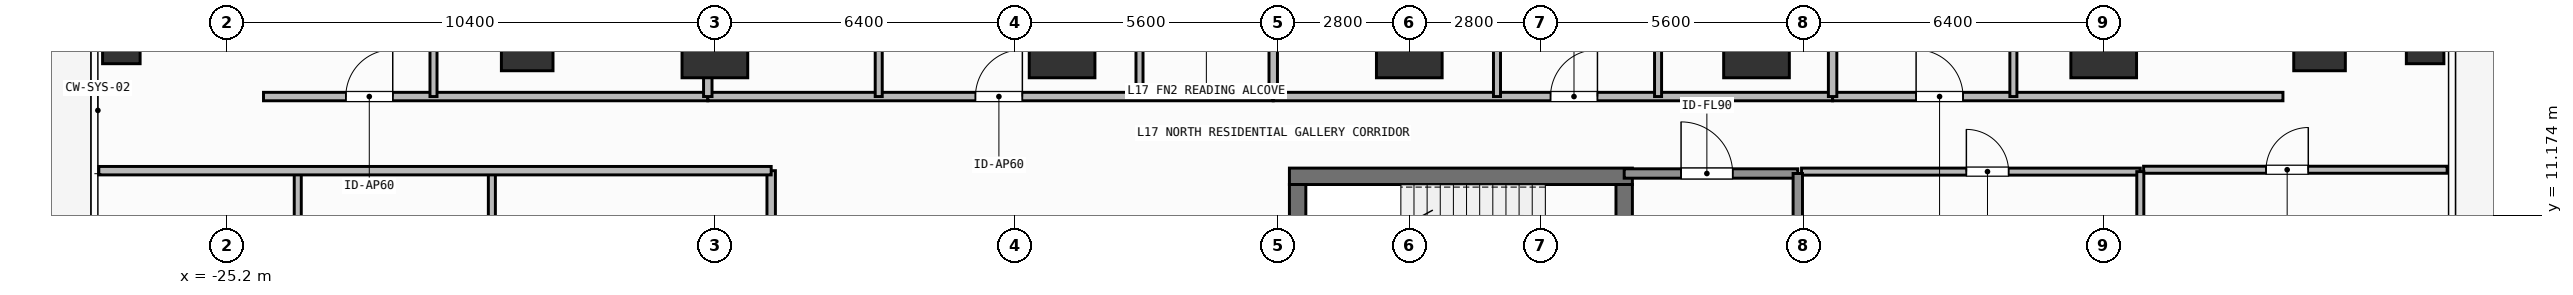
"""IFC4 building model, lengths in metres.
Left out: names, types, materials, properties, quantities, classifications, styles, units other than length and angle.
Written with IfcOpenShell. Run it as: python <this file> out.ifc"""

import sys

from ifc_helpers import new_model, si_unit, direction, frame, frame_2d, origin, origin_2d, place, context, subcontext, project, spatial, rectangle, hollow_rectangle, extrude, element, fill, save


model = new_model("IFC4")
c1 = context("Model", 3, precision=1e-05, world=origin(), true_north=direction((0.0, 1.0)))
c2 = subcontext(c1, "Body", "Model", "MODEL_VIEW")
j1 = project(units=[si_unit("LENGTHUNIT", "METRE"), si_unit("PLANEANGLEUNIT", "RADIAN")], contexts=[c1])
p1 = place(None, origin())
s1 = spatial("IfcSite", under=j1, at=p1, CompositionType="ELEMENT")
p2 = place(p1, origin())
s2 = spatial("IfcBuilding", under=s1, at=p2, CompositionType="ELEMENT")
p3 = place(p2, frame((0.0, 0.0, 65.7)))
s3 = spatial("IfcBuildingStorey", under=s2, at=p3, CompositionType="ELEMENT", Elevation=65.7)
p4 = place(p3, frame((-2.555, 12.0, 0.0), z_axis=(0.0, 0.0, 1.0), x_axis=(1.0, 0.0, 0.0)))
e1 = element("IfcWall", 1, at=p4, inside=s3, PredefinedType="SHEAR", context=c2, shape_type="SweptSolid", body=[
    extrude(rectangle(XDim=7.31, YDim=0.35, at=frame_2d((3.655, 0.0))), origin(), (0.0, 0.0, 1.0), 3.9),
])
p5 = place(p3, frame((-2.38, 8.9, 0.0), z_axis=(0.0, 0.0, 1.0), x_axis=(0.0, 1.0, 0.0)))
e2 = element("IfcWall", 2, at=p5, inside=s3, PredefinedType="SHEAR", context=c2, shape_type="SweptSolid", body=[
    extrude(rectangle(XDim=2.925, YDim=0.35, at=frame_2d((1.462, 0.0))), origin(), (0.0, 0.0, 1.0), 3.9),
])
p6 = place(p3, frame((4.58, 11.825, 0.0), z_axis=(0.0, 0.0, 1.0), x_axis=(0.0, -1.0, 0.0)))
e3 = element("IfcWall", 3, at=p6, inside=s3, PredefinedType="SHEAR", context=c2, shape_type="SweptSolid", body=[
    extrude(rectangle(XDim=2.925, YDim=0.35, at=frame_2d((1.462, 0.0))), origin(), (0.0, 0.0, 1.0), 3.9),
])
p7 = place(p6, frame((0.913, 0.0, 0.0)))
e4 = element("IfcOpeningElement", 4, at=p7, cuts=e3, PredefinedType="OPENING", context=c2, shape_type="SweptSolid", body=[
    extrude(rectangle(XDim=1.1, YDim=2.15, at=frame_2d((0.55, 1.075))), frame((0.0, 0.185, 0.0), z_axis=(0.0, -1.0, 0.0), x_axis=(1.0, 0.0, 0.0)), (0.0, 0.0, 1.0), 0.37),
])
for number, where, z_axis, x_axis in (
    (5, (-14.8, 14.8, 0.0), (0.0, 0.0, 1.0), (1.0, 0.0, 0.0)),
    (6, (-7.4, 14.8, 0.0), (0.0, 0.0, 1.0), (1.0, 0.0, 0.0)),
    (7, (0.0, 14.8, 0.0), (0.0, 0.0, 1.0), (1.0, 0.0, 0.0)),
    (8, (7.4, 14.8, 0.0), (0.0, 0.0, 1.0), (1.0, 0.0, 0.0)),
    (9, (14.8, 14.8, 0.0), (0.0, 0.0, 1.0), (1.0, 0.0, 0.0)),
):
    element("IfcColumn", number, at=place(p3, frame(where, z_axis=z_axis, x_axis=x_axis)), inside=s3, PredefinedType="COLUMN", context=c2, shape_type="SweptSolid", body=[
        extrude(rectangle(XDim=1.4, YDim=1.4, at=origin_2d()), origin(), (0.0, 0.0, 1.0), 3.9),
    ])
for number, where, z_axis, x_axis in (
    (10, (-18.8, 14.8, 0.0), (0.0, 0.0, 1.0), (1.0, 0.0, 0.0)),
    (11, (19.4, 14.8, 0.0), (0.0, 0.0, 1.0), (1.0, 0.0, 0.0)),
):
    element("IfcColumn", number, at=place(p3, frame(where, z_axis=z_axis, x_axis=x_axis)), inside=s3, PredefinedType="COLUMN", context=c2, shape_type="SweptSolid", body=[
        extrude(rectangle(XDim=1.1, YDim=1.1, at=origin_2d()), origin(), (0.0, 0.0, 1.0), 3.9),
    ])
for number, where, z_axis, x_axis in (
    (12, (-27.45, 14.8, 0.0), (0.0, 0.0, 1.0), (1.0, 0.0, 0.0)),
    (13, (21.65, 14.8, 0.0), (0.0, 0.0, 1.0), (1.0, 0.0, 0.0)),
):
    element("IfcColumn", number, at=place(p3, frame(where, z_axis=z_axis, x_axis=x_axis)), inside=s3, PredefinedType="COLUMN", context=c2, shape_type="SweptSolid", body=[
        extrude(hollow_rectangle(XDim=0.8, YDim=0.8, WallThickness=0.036, at=origin_2d()), origin(), (0.0, 0.0, 1.0), 3.9),
    ])
p8 = place(p3, frame((4.58, 12.06, 0.0), z_axis=(0.0, 0.0, 1.0), x_axis=(1.0, 0.0, 0.0)))
e14 = element("IfcWall", 14, at=p8, inside=s3, PredefinedType="SOLIDWALL", context=c2, shape_type="SweptSolid", body=[
    extrude(rectangle(XDim=3.7, YDim=0.2, at=frame_2d((1.85, 0.0))), origin(), (0.0, 0.0, 1.0), 3.68),
])
p9 = place(p8, frame((1.212, 0.0, 0.0)))
e15 = element("IfcOpeningElement", 15, at=p9, cuts=e14, PredefinedType="OPENING", context=c2, shape_type="SweptSolid", body=[
    extrude(rectangle(XDim=1.1, YDim=2.15, at=frame_2d((0.55, 1.075))), frame((0.0, 0.11, 0.0), z_axis=(0.0, -1.0, 0.0), x_axis=(1.0, 0.0, 0.0)), (0.0, 0.0, 1.0), 0.22),
])
p10 = place(p3, frame((8.36, 12.1, 0.0), z_axis=(0.0, 0.0, 1.0), x_axis=(1.0, 0.0, 0.0)))
e16 = element("IfcWall", 16, at=p10, inside=s3, PredefinedType="PARTITIONING", context=c2, shape_type="SweptSolid", body=[
    extrude(rectangle(XDim=7.22, YDim=0.15, at=frame_2d((3.61, 0.0))), origin(), (0.0, 0.0, 1.0), 3.68),
])
p11 = place(p10, frame((3.513, 0.0, 0.0)))
e17 = element("IfcOpeningElement", 17, at=p11, cuts=e16, PredefinedType="OPENING", context=c2, shape_type="SweptSolid", body=[
    extrude(rectangle(XDim=0.9, YDim=2.1, at=frame_2d((0.45, 1.05))), frame((0.0, 0.085, 0.0), z_axis=(0.0, -1.0, 0.0), x_axis=(1.0, 0.0, 0.0)), (0.0, 0.0, 1.0), 0.17),
])
p12 = place(p3, frame((-24.42, 13.7, 0.0), z_axis=(0.0, 0.0, 1.0), x_axis=(1.0, 0.0, 0.0)))
e18 = element("IfcWall", 18, at=p12, inside=s3, PredefinedType="PARTITIONING", context=c2, shape_type="SweptSolid", body=[
    extrude(rectangle(XDim=9.469, YDim=0.18, at=frame_2d((4.734, 0.0))), origin(), (0.0, 0.0, 1.0), 3.68),
])
p13 = place(p12, frame((1.754, 0.0, 0.0)))
e19 = element("IfcOpeningElement", 19, at=p13, cuts=e18, PredefinedType="OPENING", context=c2, shape_type="SweptSolid", body=[
    extrude(rectangle(XDim=1.0, YDim=2.2, at=frame_2d((0.5, 1.1))), frame((0.0, 0.1, 0.0), z_axis=(0.0, -1.0, 0.0), x_axis=(1.0, 0.0, 0.0)), (0.0, 0.0, 1.0), 0.2),
])
p14 = place(p3, frame((-20.797, 13.7, 0.0), z_axis=(0.0, 0.0, 1.0), x_axis=(0.0, 1.0, 0.0)))
e20 = element("IfcWall", 20, at=p14, inside=s3, PredefinedType="PARTITIONING", context=c2, shape_type="SweptSolid", body=[
    extrude(rectangle(XDim=3.899, YDim=0.15, at=frame_2d((1.95, 0.0))), origin(), (0.0, 0.0, 1.0), 3.68),
])
p15 = place(p14, frame((1.524, 0.0, 0.0)))
e21 = element("IfcOpeningElement", 21, at=p15, cuts=e20, PredefinedType="OPENING", context=c2, shape_type="SweptSolid", body=[
    extrude(rectangle(XDim=0.85, YDim=2.1, at=frame_2d((0.425, 1.05))), frame((0.0, 0.085, 0.0), z_axis=(0.0, -1.0, 0.0), x_axis=(1.0, 0.0, 0.0)), (0.0, 0.0, 1.0), 0.17),
])
p16 = place(p3, frame((-14.951, 13.7, 0.0), z_axis=(0.0, 0.0, 1.0), x_axis=(1.0, 0.0, 0.0)))
e22 = element("IfcWall", 22, at=p16, inside=s3, PredefinedType="PARTITIONING", context=c2, shape_type="SweptSolid", body=[
    extrude(rectangle(XDim=12.051, YDim=0.18, at=frame_2d((6.025, 0.0))), origin(), (0.0, 0.0, 1.0), 3.68),
])
p17 = place(p16, frame((5.704, 0.0, 0.0)))
e23 = element("IfcOpeningElement", 23, at=p17, cuts=e22, PredefinedType="OPENING", context=c2, shape_type="SweptSolid", body=[
    extrude(rectangle(XDim=1.0, YDim=2.2, at=frame_2d((0.5, 1.1))), frame((0.0, 0.1, 0.0), z_axis=(0.0, -1.0, 0.0), x_axis=(1.0, 0.0, 0.0)), (0.0, 0.0, 1.0), 0.2),
])
p18 = place(p3, frame((-11.308, 13.7, 0.0), z_axis=(0.0, 0.0, 1.0), x_axis=(0.0, 1.0, 0.0)))
e24 = element("IfcWall", 24, at=p18, inside=s3, PredefinedType="PARTITIONING", context=c2, shape_type="SweptSolid", body=[
    extrude(rectangle(XDim=7.09, YDim=0.15, at=frame_2d((3.545, 0.0))), origin(), (0.0, 0.0, 1.0), 3.37),
])
p19 = place(p18, frame((3.03, 0.0, 0.0)))
e25 = element("IfcOpeningElement", 25, at=p19, cuts=e24, PredefinedType="OPENING", context=c2, shape_type="SweptSolid", body=[
    extrude(rectangle(XDim=0.85, YDim=2.1, at=frame_2d((0.425, 1.05))), frame((0.0, 0.085, 0.0), z_axis=(0.0, -1.0, 0.0), x_axis=(1.0, 0.0, 0.0)), (0.0, 0.0, 1.0), 0.17),
])
p20 = place(p3, frame((-5.75, 13.7, 0.0), z_axis=(0.0, 0.0, 1.0), x_axis=(0.0, 1.0, 0.0)))
e26 = element("IfcWall", 26, at=p20, inside=s3, PredefinedType="PARTITIONING", context=c2, shape_type="SweptSolid", body=[
    extrude(rectangle(XDim=4.02, YDim=0.15, at=frame_2d((2.01, 0.0))), origin(), (0.0, 0.0, 1.0), 3.68),
])
p21 = place(p20, frame((1.941, 0.0, 0.0)))
e27 = element("IfcOpeningElement", 27, at=p21, cuts=e26, PredefinedType="OPENING", context=c2, shape_type="SweptSolid", body=[
    extrude(rectangle(XDim=0.85, YDim=2.1, at=frame_2d((0.425, 1.05))), frame((0.0, 0.085, 0.0), z_axis=(0.0, -1.0, 0.0), x_axis=(1.0, 0.0, 0.0)), (0.0, 0.0, 1.0), 0.17),
])
p22 = place(p3, frame((-2.9, 13.7, 0.0), z_axis=(0.0, 0.0, 1.0), x_axis=(1.0, 0.0, 0.0)))
e28 = element("IfcWall", 28, at=p22, inside=s3, PredefinedType="PARTITIONING", context=c2, shape_type="SweptSolid", body=[
    extrude(rectangle(XDim=11.922, YDim=0.18, at=frame_2d((5.961, 0.0))), origin(), (0.0, 0.0, 1.0), 3.68),
])
p23 = place(p22, frame((5.91, 0.0, 0.0)))
e29 = element("IfcOpeningElement", 29, at=p23, cuts=e28, PredefinedType="OPENING", context=c2, shape_type="SweptSolid", body=[
    extrude(rectangle(XDim=1.0, YDim=2.2, at=frame_2d((0.5, 1.1))), frame((0.0, 0.1, 0.0), z_axis=(0.0, -1.0, 0.0), x_axis=(1.0, 0.0, 0.0)), (0.0, 0.0, 1.0), 0.2),
])
p24 = place(p3, frame((1.869, 13.7, 0.0), z_axis=(0.0, 0.0, 1.0), x_axis=(0.0, 1.0, 0.0)))
e30 = element("IfcWall", 30, at=p24, inside=s3, PredefinedType="PARTITIONING", context=c2, shape_type="SweptSolid", body=[
    extrude(rectangle(XDim=7.09, YDim=0.15, at=frame_2d((3.545, 0.0))), origin(), (0.0, 0.0, 1.0), 3.68),
])
p25 = place(p24, frame((3.03, 0.0, 0.0)))
e31 = element("IfcOpeningElement", 31, at=p25, cuts=e30, PredefinedType="OPENING", context=c2, shape_type="SweptSolid", body=[
    extrude(rectangle(XDim=0.85, YDim=2.1, at=frame_2d((0.425, 1.05))), frame((0.0, 0.085, 0.0), z_axis=(0.0, -1.0, 0.0), x_axis=(1.0, 0.0, 0.0)), (0.0, 0.0, 1.0), 0.17),
])
p26 = place(p3, frame((5.302, 13.7, 0.0), z_axis=(0.0, 0.0, 1.0), x_axis=(0.0, 1.0, 0.0)))
e32 = element("IfcWall", 32, at=p26, inside=s3, PredefinedType="PARTITIONING", context=c2, shape_type="SweptSolid", body=[
    extrude(rectangle(XDim=7.09, YDim=0.15, at=frame_2d((3.545, 0.0))), origin(), (0.0, 0.0, 1.0), 3.68),
])
p27 = place(p26, frame((3.03, 0.0, 0.0)))
e33 = element("IfcOpeningElement", 33, at=p27, cuts=e32, PredefinedType="OPENING", context=c2, shape_type="SweptSolid", body=[
    extrude(rectangle(XDim=0.85, YDim=2.1, at=frame_2d((0.425, 1.05))), frame((0.0, 0.085, 0.0), z_axis=(0.0, -1.0, 0.0), x_axis=(1.0, 0.0, 0.0)), (0.0, 0.0, 1.0), 0.17),
])
p28 = place(p3, frame((9.022, 13.7, 0.0), z_axis=(0.0, 0.0, 1.0), x_axis=(1.0, 0.0, 0.0)))
e34 = element("IfcWall", 34, at=p28, inside=s3, PredefinedType="PARTITIONING", context=c2, shape_type="SweptSolid", body=[
    extrude(rectangle(XDim=9.598, YDim=0.18, at=frame_2d((4.799, 0.0))), origin(), (0.0, 0.0, 1.0), 3.68),
])
p29 = place(p28, frame((1.78, 0.0, 0.0)))
e35 = element("IfcOpeningElement", 35, at=p29, cuts=e34, PredefinedType="OPENING", context=c2, shape_type="SweptSolid", body=[
    extrude(rectangle(XDim=1.0, YDim=2.2, at=frame_2d((0.5, 1.1))), frame((0.0, 0.1, 0.0), z_axis=(0.0, -1.0, 0.0), x_axis=(1.0, 0.0, 0.0)), (0.0, 0.0, 1.0), 0.2),
])
p30 = place(p3, frame((12.875, 13.7, 0.0), z_axis=(0.0, 0.0, 1.0), x_axis=(0.0, 1.0, 0.0)))
e36 = element("IfcWall", 36, at=p30, inside=s3, PredefinedType="PARTITIONING", context=c2, shape_type="SweptSolid", body=[
    extrude(rectangle(XDim=3.899, YDim=0.15, at=frame_2d((1.95, 0.0))), origin(), (0.0, 0.0, 1.0), 3.68),
])
p31 = place(p30, frame((1.865, 0.0, 0.0)))
e37 = element("IfcOpeningElement", 37, at=p31, cuts=e36, PredefinedType="OPENING", context=c2, shape_type="SweptSolid", body=[
    extrude(rectangle(XDim=0.85, YDim=2.1, at=frame_2d((0.425, 1.05))), frame((0.0, 0.085, 0.0), z_axis=(0.0, -1.0, 0.0), x_axis=(1.0, 0.0, 0.0)), (0.0, 0.0, 1.0), 0.17),
])
p32 = place(p3, frame((-13.6, -0.873, 0.0), z_axis=(0.0, 0.0, 1.0), x_axis=(0.0, 1.0, 0.0)))
e38 = element("IfcWall", 38, at=p32, inside=s3, PredefinedType="PARTITIONING", context=c2, shape_type="SweptSolid", body=[
    extrude(rectangle(XDim=12.993, YDim=0.18, at=frame_2d((6.497, 0.0))), origin(), (0.0, 0.0, 1.0), 3.68),
])
p33 = place(p32, frame((6.446, 0.0, 0.0)))
e39 = element("IfcOpeningElement", 39, at=p33, cuts=e38, PredefinedType="OPENING", context=c2, shape_type="SweptSolid", body=[
    extrude(rectangle(XDim=1.0, YDim=2.2, at=frame_2d((0.5, 1.1))), frame((0.0, 0.1, 0.0), z_axis=(0.0, -1.0, 0.0), x_axis=(1.0, 0.0, 0.0)), (0.0, 0.0, 1.0), 0.2),
])
p34 = place(p3, frame((15.65, 12.14, 0.0), z_axis=(0.0, 0.0, 1.0), x_axis=(1.0, 0.0, 0.0)))
e40 = element("IfcWall", 40, at=p34, inside=s3, PredefinedType="PARTITIONING", context=c2, shape_type="SweptSolid", body=[
    extrude(rectangle(XDim=6.47, YDim=0.15, at=frame_2d((3.235, 0.0))), origin(), (0.0, 0.0, 1.0), 3.68),
])
p35 = place(p34, frame((2.61, 0.0, 0.0)))
e41 = element("IfcOpeningElement", 41, at=p35, cuts=e40, PredefinedType="OPENING", context=c2, shape_type="SweptSolid", body=[
    extrude(rectangle(XDim=0.9, YDim=2.1, at=frame_2d((0.45, 1.05))), frame((0.0, 0.085, 0.0), z_axis=(0.0, -1.0, 0.0), x_axis=(1.0, 0.0, 0.0)), (0.0, 0.0, 1.0), 0.17),
])
p36 = place(p3, frame((8.28, 8.95, 0.0), z_axis=(0.0, 0.0, 1.0), x_axis=(0.0, 1.0, 0.0)))
e42 = element("IfcWall", 42, at=p36, inside=s3, PredefinedType="SOLIDWALL", context=c2, shape_type="SweptSolid", body=[
    extrude(rectangle(XDim=3.11, YDim=0.2, at=frame_2d((1.555, 0.0))), origin(), (0.0, 0.0, 1.0), 3.68),
])
p37 = place(p3, frame((15.58, 5.85, 0.0), z_axis=(0.0, 0.0, 1.0), x_axis=(0.0, 1.0, 0.0)))
e43 = element("IfcWall", 43, at=p37, inside=s3, PredefinedType="PARTITIONING", context=c2, shape_type="SweptSolid", body=[
    extrude(rectangle(XDim=6.25, YDim=0.15, at=frame_2d((3.125, 0.0))), origin(), (0.0, 0.0, 1.0), 3.68),
])
p38 = place(p3, frame((-14.951, 13.7, 0.0), z_axis=(0.0, 0.0, 1.0), x_axis=(0.0, 1.0, 0.0)))
e44 = element("IfcWall", 44, at=p38, inside=s3, PredefinedType="PARTITIONING", context=c2, shape_type="SweptSolid", body=[
    extrude(rectangle(XDim=11.33, YDim=0.18, at=frame_2d((5.665, 0.0))), origin(), (0.0, 0.0, 1.0), 3.082),
])
for number, where, z_axis, x_axis in (
    (45, (-2.9, 13.7, 0.0), (0.0, 0.0, 1.0), (0.0, 1.0, 0.0)),
    (46, (9.022, 13.7, 0.0), (0.0, 0.0, 1.0), (0.0, 1.0, 0.0)),
):
    element("IfcWall", number, at=place(p3, frame(where, z_axis=z_axis, x_axis=x_axis)), inside=s3, PredefinedType="PARTITIONING", context=c2, shape_type="SweptSolid", body=[
        extrude(rectangle(XDim=11.33, YDim=0.18, at=frame_2d((5.665, 0.0))), origin(), (0.0, 0.0, 1.0), 3.68),
    ])
for number, where, z_axis, x_axis in (
    (47, (-19.553, 9.32, 0.0), (0.0, 0.0, 1.0), (0.0, 1.0, 0.0)),
    (48, (-23.69, 9.32, 0.0), (0.0, 0.0, 1.0), (0.0, 1.0, 0.0)),
):
    element("IfcWall", number, at=place(p3, frame(where, z_axis=z_axis, x_axis=x_axis)), inside=s3, PredefinedType="PARTITIONING", context=c2, shape_type="SweptSolid", body=[
        extrude(rectangle(XDim=2.8, YDim=0.15, at=frame_2d((1.4, 0.0))), origin(), (0.0, 0.0, 1.0), 3.68),
    ])
p39 = place(p3, frame((-27.93, 12.12, 0.0), z_axis=(0.0, 0.0, 1.0), x_axis=(1.0, 0.0, 0.0)))
e49 = element("IfcWall", 49, at=p39, inside=s3, PredefinedType="PARTITIONING", context=c2, shape_type="SweptSolid", body=[
    extrude(rectangle(XDim=14.33, YDim=0.18, at=frame_2d((7.165, 0.0))), origin(), (0.0, 0.0, 1.0), 3.68),
])
p40 = place(p9, origin())
e50 = element("IfcDoor", 50, at=p40, inside=s3, OperationType="SINGLE_SWING_LEFT", PredefinedType="DOOR", context=c2, shape_type="SweptSolid", body=[
    extrude(rectangle(XDim=1.1, YDim=2.15, at=frame_2d((0.55, 1.075))), frame((0.0, 0.025, 0.0), z_axis=(0.0, -1.0, 0.0), x_axis=(1.0, 0.0, 0.0)), (0.0, 0.0, 1.0), 0.05),
])
fill(e15, e50)
p41 = place(p11, origin())
e51 = element("IfcDoor", 51, at=p41, inside=s3, OperationType="SINGLE_SWING_LEFT", PredefinedType="DOOR", context=c2, shape_type="SweptSolid", body=[
    extrude(rectangle(XDim=0.9, YDim=2.1, at=frame_2d((0.45, 1.05))), frame((0.0, 0.025, 0.0), z_axis=(0.0, -1.0, 0.0), x_axis=(1.0, 0.0, 0.0)), (0.0, 0.0, 1.0), 0.05),
])
fill(e17, e51)
p42 = place(p13, origin())
e52 = element("IfcDoor", 52, at=p42, inside=s3, OperationType="SINGLE_SWING_RIGHT", PredefinedType="DOOR", context=c2, shape_type="SweptSolid", body=[
    extrude(rectangle(XDim=1.0, YDim=2.2, at=frame_2d((0.5, 1.1))), frame((0.0, 0.025, 0.0), z_axis=(0.0, -1.0, 0.0), x_axis=(1.0, 0.0, 0.0)), (0.0, 0.0, 1.0), 0.05),
])
fill(e19, e52)
p43 = place(p17, origin())
e53 = element("IfcDoor", 53, at=p43, inside=s3, OperationType="SINGLE_SWING_RIGHT", PredefinedType="DOOR", context=c2, shape_type="SweptSolid", body=[
    extrude(rectangle(XDim=1.0, YDim=2.2, at=frame_2d((0.5, 1.1))), frame((0.0, 0.025, 0.0), z_axis=(0.0, -1.0, 0.0), x_axis=(1.0, 0.0, 0.0)), (0.0, 0.0, 1.0), 0.05),
])
fill(e23, e53)
p44 = place(p23, origin())
e54 = element("IfcDoor", 54, at=p44, inside=s3, OperationType="SINGLE_SWING_RIGHT", PredefinedType="DOOR", context=c2, shape_type="SweptSolid", body=[
    extrude(rectangle(XDim=1.0, YDim=2.2, at=frame_2d((0.5, 1.1))), frame((0.0, 0.025, 0.0), z_axis=(0.0, -1.0, 0.0), x_axis=(1.0, 0.0, 0.0)), (0.0, 0.0, 1.0), 0.05),
])
fill(e29, e54)
p45 = place(p29, origin())
e55 = element("IfcDoor", 55, at=p45, inside=s3, OperationType="SINGLE_SWING_LEFT", PredefinedType="DOOR", context=c2, shape_type="SweptSolid", body=[
    extrude(rectangle(XDim=1.0, YDim=2.2, at=frame_2d((0.5, 1.1))), frame((0.0, 0.025, 0.0), z_axis=(0.0, -1.0, 0.0), x_axis=(1.0, 0.0, 0.0)), (0.0, 0.0, 1.0), 0.05),
])
fill(e35, e55)
p46 = place(p35, origin())
e56 = element("IfcDoor", 56, at=p46, inside=s3, OperationType="SINGLE_SWING_RIGHT", PredefinedType="DOOR", context=c2, shape_type="SweptSolid", body=[
    extrude(rectangle(XDim=0.9, YDim=2.1, at=frame_2d((0.45, 1.05))), frame((0.0, 0.025, 0.0), z_axis=(0.0, -1.0, 0.0), x_axis=(1.0, 0.0, 0.0)), (0.0, 0.0, 1.0), 0.05),
])
fill(e41, e56)
save(model, sys.argv[1])
